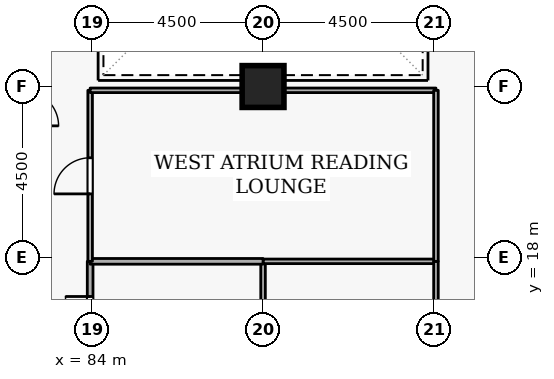
"""IFC4 building model, lengths in metres.
Left out: names, types, materials, properties, quantities, classifications, styles, units other than length and angle.
Written with IfcOpenShell. Run it as: python <this file> out.ifc"""

import sys

from ifc_helpers import new_model, si_unit, direction, frame, frame_2d, origin, origin_2d, place, context, subcontext, project, spatial, rectangle, extrude, element, fill, save


model = new_model("IFC4")
c1 = context("Model", 3, precision=1e-05, world=origin(), true_north=direction((0.0, 1.0)))
c2 = subcontext(c1, "Body", "Model", "MODEL_VIEW")
j1 = project(units=[si_unit("LENGTHUNIT", "METRE"), si_unit("PLANEANGLEUNIT", "RADIAN")], contexts=[c1])
p1 = place(None, origin())
s1 = spatial("IfcSite", under=j1, at=p1, CompositionType="ELEMENT")
p2 = place(p1, origin())
s2 = spatial("IfcBuilding", under=s1, at=p2, CompositionType="ELEMENT")
p3 = place(p2, frame((0.0, 0.0, 163.5)))
s3 = spatial("IfcBuildingStorey", under=s2, at=p3, CompositionType="ELEMENT", Elevation=163.5)
p4 = place(p3, frame((88.5, 22.5, 0.0), z_axis=(0.0, 0.0, 1.0), x_axis=(1.0, 0.0, 0.0)))
e1 = element("IfcColumn", 1, at=p4, inside=s3, PredefinedType="COLUMN", context=c2, shape_type="SweptSolid", body=[
    extrude(rectangle(XDim=1.1, YDim=1.1, at=origin_2d()), origin(), (0.0, 0.0, 1.0), 3.6),
])
p5 = place(p3, frame((88.5, 9.28, 0.0), z_axis=(0.0, 0.0, 1.0), x_axis=(0.0, 1.0, 0.0)))
e2 = element("IfcWall", 2, at=p5, inside=s3, PredefinedType="PARTITIONING", context=c2, shape_type="SweptSolid", body=[
    extrude(rectangle(XDim=8.62, YDim=0.12, at=frame_2d((4.31, 0.0))), origin(), (0.0, 0.0, 1.0), 2.878),
])
p6 = place(p3, frame((88.5, 17.9, 0.0), z_axis=(0.0, 0.0, 1.0), x_axis=(1.0, 0.0, 0.0)))
e3 = element("IfcWall", 3, at=p6, inside=s3, PredefinedType="PARTITIONING", context=c2, shape_type="SweptSolid", body=[
    extrude(rectangle(XDim=4.55, YDim=0.12, at=frame_2d((2.275, 0.0))), origin(), (0.0, 0.0, 1.0), 3.34),
])
p7 = place(p3, frame((93.05, 17.9, 0.0), z_axis=(0.0, 0.0, 1.0), x_axis=(0.0, -1.0, 0.0)))
e4 = element("IfcWall", 4, at=p7, inside=s3, PredefinedType="PARTITIONING", context=c2, shape_type="SweptSolid", body=[
    extrude(rectangle(XDim=1.2, YDim=0.12, at=frame_2d((0.6, 0.0))), origin(), (0.0, 0.0, 1.0), 3.34),
])
p8 = place(p3, frame((83.95, 14.75, 0.0), z_axis=(0.0, 0.0, 1.0), x_axis=(0.0, 1.0, 0.0)))
e5 = element("IfcWall", 5, at=p8, inside=s3, PredefinedType="PARTITIONING", context=c2, shape_type="SweptSolid", body=[
    extrude(rectangle(XDim=3.15, YDim=0.15, at=frame_2d((1.575, 0.0))), origin(), (0.0, 0.0, 1.0), 3.34),
])
p9 = place(p8, frame((0.925, 0.0, 0.0)))
e6 = element("IfcOpeningElement", 6, at=p9, cuts=e5, PredefinedType="OPENING", context=c2, shape_type="SweptSolid", body=[
    extrude(rectangle(XDim=1.3, YDim=2.12, at=frame_2d((0.65, 1.06))), frame((0.0, 0.085, 0.0), z_axis=(0.0, -1.0, 0.0), x_axis=(1.0, 0.0, 0.0)), (0.0, 0.0, 1.0), 0.17),
])
p10 = place(p3, frame((83.95, 17.9, 0.0), z_axis=(0.0, 0.0, 1.0), x_axis=(1.0, 0.0, 0.0)))
e7 = element("IfcWall", 7, at=p10, inside=s3, PredefinedType="PARTITIONING", context=c2, shape_type="SweptSolid", body=[
    extrude(rectangle(XDim=4.55, YDim=0.15, at=frame_2d((2.275, 0.0))), origin(), (0.0, 0.0, 1.0), 3.34),
])
p11 = place(p3, frame((83.95, 17.9, 0.0), z_axis=(0.0, 0.0, 1.0), x_axis=(0.0, 1.0, 0.0)))
e8 = element("IfcWall", 8, at=p11, inside=s3, PredefinedType="PARTITIONING", context=c2, shape_type="SweptSolid", body=[
    extrude(rectangle(XDim=4.5, YDim=0.12, at=frame_2d((2.25, 0.0))), origin(), (0.0, 0.0, 1.0), 3.34),
])
p12 = place(p11, frame((1.775, 0.0, 0.0)))
e9 = element("IfcOpeningElement", 9, at=p12, cuts=e8, PredefinedType="OPENING", context=c2, shape_type="SweptSolid", body=[
    extrude(rectangle(XDim=0.95, YDim=2.1, at=frame_2d((0.475, 1.05))), frame((0.0, 0.07, 0.0), z_axis=(0.0, -1.0, 0.0), x_axis=(1.0, 0.0, 0.0)), (0.0, 0.0, 1.0), 0.14),
])
p13 = place(p3, frame((83.95, 22.4, 0.0), z_axis=(0.0, 0.0, 1.0), x_axis=(1.0, 0.0, 0.0)))
e10 = element("IfcWall", 10, at=p13, inside=s3, PredefinedType="PARTITIONING", context=c2, shape_type="SweptSolid", body=[
    extrude(rectangle(XDim=9.1, YDim=0.12, at=frame_2d((4.55, 0.0))), origin(), (0.0, 0.0, 1.0), 3.34),
])
p14 = place(p3, frame((93.05, 22.4, 0.0), z_axis=(0.0, 0.0, 1.0), x_axis=(0.0, -1.0, 0.0)))
e11 = element("IfcWall", 11, at=p14, inside=s3, PredefinedType="PARTITIONING", context=c2, shape_type="SweptSolid", body=[
    extrude(rectangle(XDim=4.5, YDim=0.12, at=frame_2d((2.25, 0.0))), origin(), (0.0, 0.0, 1.0), 3.34),
])
p15 = place(p9, origin())
e12 = element("IfcDoor", 12, at=p15, inside=s3, OperationType="DOUBLE_DOOR_SINGLE_SWING", PredefinedType="DOOR", context=c2, shape_type="SweptSolid", body=[
    extrude(rectangle(XDim=1.3, YDim=2.12, at=frame_2d((0.65, 1.06))), frame((0.0, 0.025, 0.0), z_axis=(0.0, -1.0, 0.0), x_axis=(1.0, 0.0, 0.0)), (0.0, 0.0, 1.0), 0.05),
])
fill(e6, e12)
p16 = place(p12, origin())
e13 = element("IfcDoor", 13, at=p16, inside=s3, OperationType="SINGLE_SWING_LEFT", PredefinedType="DOOR", context=c2, shape_type="SweptSolid", body=[
    extrude(rectangle(XDim=0.95, YDim=2.1, at=frame_2d((0.475, 1.05))), frame((0.0, 0.025, 0.0), z_axis=(0.0, -1.0, 0.0), x_axis=(1.0, 0.0, 0.0)), (0.0, 0.0, 1.0), 0.05),
])
fill(e9, e13)
save(model, sys.argv[1])
